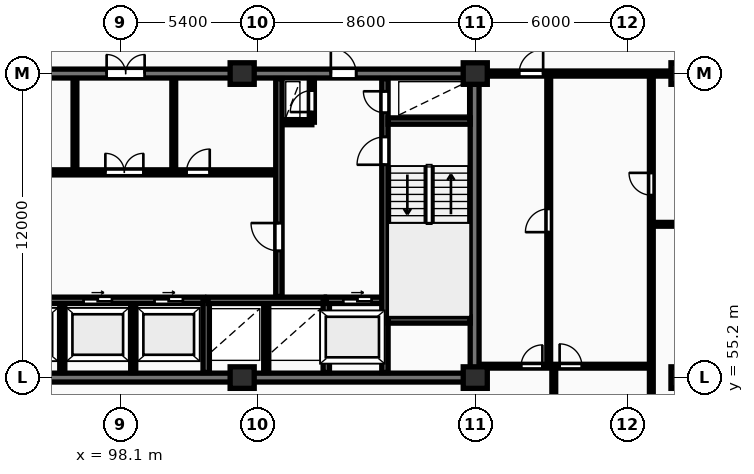
"""IFC4 building model, lengths in metres.
Left out: names, types, materials, properties, quantities, classifications, styles, units other than length and angle.
Written with IfcOpenShell. Run it as: python <this file> out.ifc"""

import sys

from ifc_helpers import new_model, si_unit, direction, frame, frame_2d, origin, origin_2d, place, context, subcontext, project, spatial, rectangle, extrude, element, fill, save


model = new_model("IFC4")
c1 = context("Model", 3, precision=1e-05, world=origin(), true_north=direction((0.0, 1.0)))
c2 = subcontext(c1, "Body", "Model", "MODEL_VIEW")
j1 = project(units=[si_unit("LENGTHUNIT", "METRE"), si_unit("PLANEANGLEUNIT", "RADIAN")], contexts=[c1])
p1 = place(None, origin())
s1 = spatial("IfcSite", under=j1, at=p1, CompositionType="ELEMENT")
p2 = place(p1, origin())
s2 = spatial("IfcBuilding", under=s1, at=p2, CompositionType="ELEMENT")
p3 = place(p2, frame((0.0, 0.0, 126.3)))
s3 = spatial("IfcBuildingStorey", under=s2, at=p3, CompositionType="ELEMENT", Elevation=126.3)
for number, where, z_axis, x_axis in (
    (1, (102.9, 55.2, 0.0), (0.0, 0.0, 1.0), (1.0, 0.0, 0.0)),
    (2, (102.9, 67.2, 0.0), (0.0, 0.0, 1.0), (1.0, 0.0, 0.0)),
    (3, (112.1, 55.2, 0.0), (0.0, 0.0, 1.0), (1.0, 0.0, 0.0)),
    (4, (112.1, 67.2, 0.0), (0.0, 0.0, 1.0), (1.0, 0.0, 0.0)),
    (5, (120.3, 55.2, 0.0), (0.0, 0.0, 1.0), (1.0, 0.0, 0.0)),
    (6, (120.3, 67.2, 0.0), (0.0, 0.0, 1.0), (1.0, 0.0, 0.0)),
):
    element("IfcColumn", number, at=place(p3, frame(where, z_axis=z_axis, x_axis=x_axis)), inside=s3, PredefinedType="COLUMN", context=c2, shape_type="SweptSolid", body=[
        extrude(rectangle(XDim=0.95, YDim=0.85, at=origin_2d()), origin(), (0.0, 0.0, 1.0), 3.25),
    ])
p4 = place(p3, frame((75.95, 55.2, 0.0), z_axis=(0.0, 0.0, 1.0), x_axis=(1.0, 0.0, 0.0)))
e7 = element("IfcWall", 7, at=p4, inside=s3, PredefinedType="SHEAR", context=c2, shape_type="SweptSolid", body=[
    extrude(rectangle(XDim=36.3, YDim=0.35, at=frame_2d((18.15, 0.0))), origin(), (0.0, 0.0, 1.0), 3.25),
])
p5 = place(p3, frame((112.075, 55.375, 0.0), z_axis=(0.0, 0.0, 1.0), x_axis=(0.0, 1.0, 0.0)))
e8 = element("IfcWall", 8, at=p5, inside=s3, PredefinedType="SHEAR", context=c2, shape_type="SweptSolid", body=[
    extrude(rectangle(XDim=11.65, YDim=0.35, at=frame_2d((5.825, 0.0))), origin(), (0.0, 0.0, 1.0), 3.25),
])
p6 = place(p3, frame((75.95, 67.2, 0.0), z_axis=(0.0, 0.0, 1.0), x_axis=(1.0, 0.0, 0.0)))
e9 = element("IfcWall", 9, at=p6, inside=s3, PredefinedType="SHEAR", context=c2, shape_type="SweptSolid", body=[
    extrude(rectangle(XDim=36.3, YDim=0.35, at=frame_2d((18.15, 0.0))), origin(), (0.0, 0.0, 1.0), 3.25),
])
p7 = place(p6, frame((5.25, 0.0, 0.0)))
e10 = element("IfcOpeningElement", 10, at=p7, cuts=e9, PredefinedType="OPENING", context=c2, shape_type="SweptSolid", body=[
    extrude(rectangle(XDim=1.0, YDim=2.15, at=frame_2d((0.5, 1.075))), frame((0.0, 0.185, 0.0), z_axis=(0.0, -1.0, 0.0), x_axis=(1.0, 0.0, 0.0)), (0.0, 0.0, 1.0), 0.37),
])
p8 = place(p6, frame((21.6, 0.0, 0.0)))
e11 = element("IfcOpeningElement", 11, at=p8, cuts=e9, PredefinedType="OPENING", context=c2, shape_type="SweptSolid", body=[
    extrude(rectangle(XDim=1.5, YDim=2.2, at=frame_2d((0.75, 1.1))), frame((0.0, 0.185, 0.0), z_axis=(0.0, -1.0, 0.0), x_axis=(1.0, 0.0, 0.0)), (0.0, 0.0, 1.0), 0.37),
])
p9 = place(p6, frame((30.45, 0.0, 0.0)))
e12 = element("IfcOpeningElement", 12, at=p9, cuts=e9, PredefinedType="OPENING", context=c2, shape_type="SweptSolid", body=[
    extrude(rectangle(XDim=1.0, YDim=2.15, at=frame_2d((0.5, 1.075))), frame((0.0, 0.185, 0.0), z_axis=(0.0, -1.0, 0.0), x_axis=(1.0, 0.0, 0.0)), (0.0, 0.0, 1.0), 0.37),
])
for number, where, z_axis, x_axis in (
    (13, (95.8, 55.4, 0.0), (0.0, 0.0, 1.0), (0.0, 1.0, 0.0)),
    (14, (98.6, 55.4, 0.0), (0.0, 0.0, 1.0), (0.0, 1.0, 0.0)),
):
    element("IfcWall", number, at=place(p3, frame(where, z_axis=z_axis, x_axis=x_axis)), inside=s3, PredefinedType="PARTITIONING", context=c2, shape_type="SweptSolid", body=[
        extrude(rectangle(XDim=2.72, YDim=0.2, at=frame_2d((1.36, 0.0))), origin(), (0.0, 0.0, 1.0), 2.97),
    ])
p10 = place(p3, frame((93.02, 58.25, 0.0), z_axis=(0.0, 0.0, 1.0), x_axis=(1.0, 0.0, 0.0)))
e15 = element("IfcWall", 15, at=p10, inside=s3, PredefinedType="SHEAR", context=c2, shape_type="SweptSolid", body=[
    extrude(rectangle(XDim=8.36, YDim=0.25, at=frame_2d((4.18, 0.0))), origin(), (0.0, 0.0, 1.0), 3.25),
])
p11 = place(p10, frame((0.82, 0.0, 0.0)))
e16 = element("IfcOpeningElement", 16, at=p11, cuts=e15, PredefinedType="OPENING", context=c2, shape_type="SweptSolid", body=[
    extrude(rectangle(XDim=1.12, YDim=2.12, at=frame_2d((0.56, 1.06))), frame((0.0, 0.135, 0.0), z_axis=(0.0, -1.0, 0.0), x_axis=(1.0, 0.0, 0.0)), (0.0, 0.0, 1.0), 0.27),
])
p12 = place(p10, frame((3.62, 0.0, 0.0)))
e17 = element("IfcOpeningElement", 17, at=p12, cuts=e15, PredefinedType="OPENING", context=c2, shape_type="SweptSolid", body=[
    extrude(rectangle(XDim=1.12, YDim=2.12, at=frame_2d((0.56, 1.06))), frame((0.0, 0.135, 0.0), z_axis=(0.0, -1.0, 0.0), x_axis=(1.0, 0.0, 0.0)), (0.0, 0.0, 1.0), 0.27),
])
p13 = place(p10, frame((6.42, 0.0, 0.0)))
e18 = element("IfcOpeningElement", 18, at=p13, cuts=e15, PredefinedType="OPENING", context=c2, shape_type="SweptSolid", body=[
    extrude(rectangle(XDim=1.12, YDim=2.12, at=frame_2d((0.56, 1.06))), frame((0.0, 0.135, 0.0), z_axis=(0.0, -1.0, 0.0), x_axis=(1.0, 0.0, 0.0)), (0.0, 0.0, 1.0), 0.27),
])
p14 = place(p3, frame((101.48, 55.4, 0.0), z_axis=(0.0, 0.0, 1.0), x_axis=(0.0, 1.0, 0.0)))
e19 = element("IfcWall", 19, at=p14, inside=s3, PredefinedType="SHEAR", context=c2, shape_type="SweptSolid", body=[
    extrude(rectangle(XDim=2.85, YDim=0.25, at=frame_2d((1.425, 0.0))), origin(), (0.0, 0.0, 1.0), 3.25),
])
p15 = place(p3, frame((103.85, 55.4, 0.0), z_axis=(0.0, 0.0, 1.0), x_axis=(0.0, 1.0, 0.0)))
e20 = element("IfcWall", 20, at=p15, inside=s3, PredefinedType="PARTITIONING", context=c2, shape_type="SweptSolid", body=[
    extrude(rectangle(XDim=2.72, YDim=0.2, at=frame_2d((1.36, 0.0))), origin(), (0.0, 0.0, 1.0), 2.97),
])
p16 = place(p3, frame((101.55, 58.25, 0.0), z_axis=(0.0, 0.0, 1.0), x_axis=(1.0, 0.0, 0.0)))
e21 = element("IfcWall", 21, at=p16, inside=s3, PredefinedType="SHEAR", context=c2, shape_type="SweptSolid", body=[
    extrude(rectangle(XDim=4.6, YDim=0.25, at=frame_2d((2.3, 0.0))), origin(), (0.0, 0.0, 1.0), 3.25),
])
p17 = place(p3, frame((106.22, 55.4, 0.0), z_axis=(0.0, 0.0, 1.0), x_axis=(0.0, 1.0, 0.0)))
e22 = element("IfcWall", 22, at=p17, inside=s3, PredefinedType="SHEAR", context=c2, shape_type="SweptSolid", body=[
    extrude(rectangle(XDim=2.85, YDim=0.25, at=frame_2d((1.425, 0.0))), origin(), (0.0, 0.0, 1.0), 3.25),
])
p18 = place(p3, frame((106.22, 58.25, 0.0), z_axis=(0.0, 0.0, 1.0), x_axis=(1.0, 0.0, 0.0)))
e23 = element("IfcWall", 23, at=p18, inside=s3, PredefinedType="SHEAR", context=c2, shape_type="SweptSolid", body=[
    extrude(rectangle(XDim=2.46, YDim=0.25, at=frame_2d((1.23, 0.0))), origin(), (0.0, 0.0, 1.0), 3.25),
])
p19 = place(p18, frame((0.67, 0.0, 0.0)))
e24 = element("IfcOpeningElement", 24, at=p19, cuts=e23, PredefinedType="OPENING", context=c2, shape_type="SweptSolid", body=[
    extrude(rectangle(XDim=1.12, YDim=2.12, at=frame_2d((0.56, 1.06))), frame((0.0, 0.135, 0.0), z_axis=(0.0, -1.0, 0.0), x_axis=(1.0, 0.0, 0.0)), (0.0, 0.0, 1.0), 0.27),
])
for number, where, z_axis, x_axis in (
    (25, (96.3, 63.4, 0.0), (0.0, 0.0, 1.0), (0.0, 1.0, 0.0)),
    (26, (100.2, 63.4, 0.0), (0.0, 0.0, 1.0), (0.0, 1.0, 0.0)),
):
    element("IfcWall", number, at=place(p3, frame(where, z_axis=z_axis, x_axis=x_axis)), inside=s3, PredefinedType="PARTITIONING", context=c2, shape_type="SweptSolid", body=[
        extrude(rectangle(XDim=3.6, YDim=0.15, at=frame_2d((1.8, 0.0))), origin(), (0.0, 0.0, 1.0), 2.97),
    ])
p20 = place(p3, frame((84.42, 63.3, 0.0), z_axis=(0.0, 0.0, 1.0), x_axis=(1.0, 0.0, 0.0)))
e27 = element("IfcWall", 27, at=p20, inside=s3, PredefinedType="PARTITIONING", context=c2, shape_type="SweptSolid", body=[
    extrude(rectangle(XDim=19.83, YDim=0.2, at=frame_2d((9.915, 0.0))), origin(), (0.0, 0.0, 1.0), 2.97),
])
p21 = place(p20, frame((1.15, 0.0, 0.0)))
e28 = element("IfcOpeningElement", 28, at=p21, cuts=e27, PredefinedType="OPENING", context=c2, shape_type="SweptSolid", body=[
    extrude(rectangle(XDim=0.85, YDim=2.05, at=frame_2d((0.425, 1.025))), frame((0.0, 0.11, 0.0), z_axis=(0.0, -1.0, 0.0), x_axis=(1.0, 0.0, 0.0)), (0.0, 0.0, 1.0), 0.22),
])
p22 = place(p20, frame((3.25, 0.0, 0.0)))
e29 = element("IfcOpeningElement", 29, at=p22, cuts=e27, PredefinedType="OPENING", context=c2, shape_type="SweptSolid", body=[
    extrude(rectangle(XDim=0.85, YDim=2.05, at=frame_2d((0.425, 1.025))), frame((0.0, 0.11, 0.0), z_axis=(0.0, -1.0, 0.0), x_axis=(1.0, 0.0, 0.0)), (0.0, 0.0, 1.0), 0.22),
])
p23 = place(p20, frame((13.08, 0.0, 0.0)))
e30 = element("IfcOpeningElement", 30, at=p23, cuts=e27, PredefinedType="OPENING", context=c2, shape_type="SweptSolid", body=[
    extrude(rectangle(XDim=1.5, YDim=2.2, at=frame_2d((0.75, 1.1))), frame((0.0, 0.11, 0.0), z_axis=(0.0, -1.0, 0.0), x_axis=(1.0, 0.0, 0.0)), (0.0, 0.0, 1.0), 0.22),
])
p24 = place(p20, frame((6.78, 0.0, 0.0)))
e31 = element("IfcOpeningElement", 31, at=p24, cuts=e27, PredefinedType="OPENING", context=c2, shape_type="SweptSolid", body=[
    extrude(rectangle(XDim=0.92, YDim=2.08, at=frame_2d((0.46, 1.04))), frame((0.0, 0.11, 0.0), z_axis=(0.0, -1.0, 0.0), x_axis=(1.0, 0.0, 0.0)), (0.0, 0.0, 1.0), 0.22),
])
p25 = place(p20, frame((16.28, 0.0, 0.0)))
e32 = element("IfcOpeningElement", 32, at=p25, cuts=e27, PredefinedType="OPENING", context=c2, shape_type="SweptSolid", body=[
    extrude(rectangle(XDim=0.92, YDim=2.08, at=frame_2d((0.46, 1.04))), frame((0.0, 0.11, 0.0), z_axis=(0.0, -1.0, 0.0), x_axis=(1.0, 0.0, 0.0)), (0.0, 0.0, 1.0), 0.22),
])
p26 = place(p3, frame((104.45, 65.28, 0.0), z_axis=(0.0, 0.0, 1.0), x_axis=(1.0, 0.0, 0.0)))
e33 = element("IfcWall", 33, at=p26, inside=s3, PredefinedType="PARTITIONING", context=c2, shape_type="SweptSolid", body=[
    extrude(rectangle(XDim=1.2, YDim=0.2, at=frame_2d((0.6, 0.0))), origin(), (0.0, 0.0, 1.0), 2.97),
])
p27 = place(p3, frame((105.65, 65.28, 0.0), z_axis=(0.0, 0.0, 1.0), x_axis=(0.0, 1.0, 0.0)))
e34 = element("IfcWall", 34, at=p27, inside=s3, PredefinedType="PARTITIONING", context=c2, shape_type="SweptSolid", body=[
    extrude(rectangle(XDim=1.72, YDim=0.2, at=frame_2d((0.86, 0.0))), origin(), (0.0, 0.0, 1.0), 2.97),
])
p28 = place(p27, frame((0.4, 0.0, 0.0)))
e35 = element("IfcOpeningElement", 35, at=p28, cuts=e34, PredefinedType="OPENING", context=c2, shape_type="SweptSolid", body=[
    extrude(rectangle(XDim=0.85, YDim=2.05, at=frame_2d((0.425, 1.025))), frame((0.0, 0.11, 0.0), z_axis=(0.0, -1.0, 0.0), x_axis=(1.0, 0.0, 0.0)), (0.0, 0.0, 1.0), 0.22),
])
p29 = place(p3, frame((104.35, 58.4, 0.0), z_axis=(0.0, 0.0, 1.0), x_axis=(0.0, 1.0, 0.0)))
e36 = element("IfcWall", 36, at=p29, inside=s3, PredefinedType="SHEAR", context=c2, shape_type="SweptSolid", body=[
    extrude(rectangle(XDim=8.6, YDim=0.25, at=frame_2d((4.3, 0.0))), origin(), (0.0, 0.0, 1.0), 3.25),
])
p30 = place(p29, frame((1.8, 0.0, 0.0)))
e37 = element("IfcOpeningElement", 37, at=p30, cuts=e36, PredefinedType="OPENING", context=c2, shape_type="SweptSolid", body=[
    extrude(rectangle(XDim=1.1, YDim=2.1, at=frame_2d((0.55, 1.05))), frame((0.0, 0.135, 0.0), z_axis=(0.0, -1.0, 0.0), x_axis=(1.0, 0.0, 0.0)), (0.0, 0.0, 1.0), 0.27),
])
p31 = place(p3, frame((108.535, 55.4, 0.0), z_axis=(0.0, 0.0, 1.0), x_axis=(0.0, 1.0, 0.0)))
e38 = element("IfcWall", 38, at=p31, inside=s3, PredefinedType="SHEAR", context=c2, shape_type="SweptSolid", body=[
    extrude(rectangle(XDim=11.6, YDim=0.25, at=frame_2d((5.8, 0.0))), origin(), (0.0, 0.0, 1.0), 3.25),
])
p32 = place(p31, frame((8.2, 0.0, 0.0)))
e39 = element("IfcOpeningElement", 39, at=p32, cuts=e38, PredefinedType="OPENING", context=c2, shape_type="SweptSolid", body=[
    extrude(rectangle(XDim=1.1, YDim=2.1, at=frame_2d((0.55, 1.05))), frame((0.0, 0.135, 0.0), z_axis=(0.0, -1.0, 0.0), x_axis=(1.0, 0.0, 0.0)), (0.0, 0.0, 1.0), 0.27),
])
p33 = place(p31, frame((10.25, 0.0, 0.0)))
e40 = element("IfcOpeningElement", 40, at=p33, cuts=e38, PredefinedType="OPENING", context=c2, shape_type="SweptSolid", body=[
    extrude(rectangle(XDim=0.85, YDim=2.05, at=frame_2d((0.425, 1.025))), frame((0.0, 0.135, 0.0), z_axis=(0.0, -1.0, 0.0), x_axis=(1.0, 0.0, 0.0)), (0.0, 0.0, 1.0), 0.27),
])
for number, where, z_axis, x_axis in (
    (41, (108.66, 57.475, 0.0), (0.0, 0.0, 1.0), (1.0, 0.0, 0.0)),
    (42, (108.66, 65.325, 0.0), (0.0, 0.0, 1.0), (1.0, 0.0, 0.0)),
):
    element("IfcWall", number, at=place(p3, frame(where, z_axis=z_axis, x_axis=x_axis)), inside=s3, PredefinedType="SHEAR", context=c2, shape_type="SweptSolid", body=[
        extrude(rectangle(XDim=3.24, YDim=0.25, at=frame_2d((1.62, 0.0))), origin(), (0.0, 0.0, 1.0), 3.25),
    ])
p34 = place(p3, frame((119.05, 61.25, 0.0), z_axis=(0.0, 0.0, 1.0), x_axis=(1.0, 0.0, 0.0)))
e43 = element("IfcWall", 43, at=p34, inside=s3, PredefinedType="PARTITIONING", context=c2, shape_type="SweptSolid", body=[
    extrude(rectangle(XDim=11.55, YDim=0.15, at=frame_2d((5.775, 0.0))), origin(), (0.0, 0.0, 1.0), 2.97),
])
p35 = place(p34, frame((5.355, 0.0, 0.0)))
e44 = element("IfcOpeningElement", 44, at=p35, cuts=e43, PredefinedType="OPENING", context=c2, shape_type="SweptSolid", body=[
    extrude(rectangle(XDim=0.84, YDim=2.04, at=frame_2d((0.42, 1.02))), frame((0.0, 0.085, 0.0), z_axis=(0.0, -1.0, 0.0), x_axis=(1.0, 0.0, 0.0)), (0.0, 0.0, 1.0), 0.17),
])
p36 = place(p3, frame((119.05, 51.1, 0.0), z_axis=(0.0, 0.0, 1.0), x_axis=(0.0, 1.0, 0.0)))
e45 = element("IfcWall", 45, at=p36, inside=s3, PredefinedType="PARTITIONING", context=c2, shape_type="SweptSolid", body=[
    extrude(rectangle(XDim=16.05, YDim=0.15, at=frame_2d((8.025, 0.0))), origin(), (0.0, 0.0, 1.0), 2.97),
])
p37 = place(p36, frame((11.3, 0.0, 0.0)))
e46 = element("IfcOpeningElement", 46, at=p37, cuts=e45, PredefinedType="OPENING", context=c2, shape_type="SweptSolid", body=[
    extrude(rectangle(XDim=0.88, YDim=2.06, at=frame_2d((0.44, 1.03))), frame((0.0, 0.085, 0.0), z_axis=(0.0, -1.0, 0.0), x_axis=(1.0, 0.0, 0.0)), (0.0, 0.0, 1.0), 0.17),
])
p38 = place(p3, frame((115.0, 55.65, 0.0), z_axis=(0.0, 0.0, 1.0), x_axis=(0.0, 1.0, 0.0)))
e47 = element("IfcWall", 47, at=p38, inside=s3, PredefinedType="PARTITIONING", context=c2, shape_type="SweptSolid", body=[
    extrude(rectangle(XDim=11.5, YDim=0.15, at=frame_2d((5.75, 0.0))), origin(), (0.0, 0.0, 1.0), 2.97),
])
p39 = place(p38, frame((5.29, 0.0, 0.0)))
e48 = element("IfcOpeningElement", 48, at=p39, cuts=e47, PredefinedType="OPENING", context=c2, shape_type="SweptSolid", body=[
    extrude(rectangle(XDim=0.92, YDim=2.08, at=frame_2d((0.46, 1.04))), frame((0.0, 0.085, 0.0), z_axis=(0.0, -1.0, 0.0), x_axis=(1.0, 0.0, 0.0)), (0.0, 0.0, 1.0), 0.17),
])
p40 = place(p3, frame((115.2, 51.1, 0.0), z_axis=(0.0, 0.0, 1.0), x_axis=(0.0, 1.0, 0.0)))
e49 = element("IfcWall", 49, at=p40, inside=s3, PredefinedType="PARTITIONING", context=c2, shape_type="SweptSolid", body=[
    extrude(rectangle(XDim=4.55, YDim=0.15, at=frame_2d((2.275, 0.0))), origin(), (0.0, 0.0, 1.0), 2.97),
])
p41 = place(p3, frame((112.27, 55.65, 0.0), z_axis=(0.0, 0.0, 1.0), x_axis=(1.0, 0.0, 0.0)))
e50 = element("IfcWall", 50, at=p41, inside=s3, PredefinedType="PARTITIONING", context=c2, shape_type="SweptSolid", body=[
    extrude(rectangle(XDim=6.76, YDim=0.15, at=frame_2d((3.38, 0.0))), origin(), (0.0, 0.0, 1.0), 2.97),
])
p42 = place(p41, frame((1.64, 0.0, 0.0)))
e51 = element("IfcOpeningElement", 51, at=p42, cuts=e50, PredefinedType="OPENING", context=c2, shape_type="SweptSolid", body=[
    extrude(rectangle(XDim=0.84, YDim=2.04, at=frame_2d((0.42, 1.02))), frame((0.0, 0.085, 0.0), z_axis=(0.0, -1.0, 0.0), x_axis=(1.0, 0.0, 0.0)), (0.0, 0.0, 1.0), 0.17),
])
p43 = place(p41, frame((3.16, 0.0, 0.0)))
e52 = element("IfcOpeningElement", 52, at=p43, cuts=e50, PredefinedType="OPENING", context=c2, shape_type="SweptSolid", body=[
    extrude(rectangle(XDim=0.88, YDim=2.06, at=frame_2d((0.44, 1.03))), frame((0.0, 0.085, 0.0), z_axis=(0.0, -1.0, 0.0), x_axis=(1.0, 0.0, 0.0)), (0.0, 0.0, 1.0), 0.17),
])
p44 = place(p3, frame((112.25, 67.2, 0.0), z_axis=(0.0, 0.0, 1.0), x_axis=(1.0, 0.0, 0.0)))
e53 = element("IfcWall", 53, at=p44, inside=s3, PredefinedType="PARTITIONING", context=c2, shape_type="SweptSolid", body=[
    extrude(rectangle(XDim=18.35, YDim=0.2, at=frame_2d((9.175, 0.0))), origin(), (0.0, 0.0, 1.0), 2.433),
])
p45 = place(p44, frame((1.58, 0.0, 0.0)))
e54 = element("IfcOpeningElement", 54, at=p45, cuts=e53, PredefinedType="OPENING", context=c2, shape_type="SweptSolid", body=[
    extrude(rectangle(XDim=0.95, YDim=2.15, at=frame_2d((0.475, 1.075))), frame((0.0, 0.11, 0.0), z_axis=(0.0, -1.0, 0.0), x_axis=(1.0, 0.0, 0.0)), (0.0, 0.0, 1.0), 0.22),
])
p46 = place(p8, origin())
e55 = element("IfcDoor", 55, at=p46, inside=s3, OperationType="DOUBLE_DOOR_SINGLE_SWING", PredefinedType="DOOR", context=c2, shape_type="SweptSolid", body=[
    extrude(rectangle(XDim=1.5, YDim=2.2, at=frame_2d((0.75, 1.1))), frame((0.0, 0.025, 0.0), z_axis=(0.0, -1.0, 0.0), x_axis=(1.0, 0.0, 0.0)), (0.0, 0.0, 1.0), 0.05),
])
fill(e11, e55)
p47 = place(p9, origin())
e56 = element("IfcDoor", 56, at=p47, inside=s3, OperationType="SINGLE_SWING_LEFT", PredefinedType="DOOR", context=c2, shape_type="SweptSolid", body=[
    extrude(rectangle(XDim=1.0, YDim=2.15, at=frame_2d((0.5, 1.075))), frame((0.0, 0.025, 0.0), z_axis=(0.0, -1.0, 0.0), x_axis=(1.0, 0.0, 0.0)), (0.0, 0.0, 1.0), 0.05),
])
fill(e12, e56)
p48 = place(p12, origin())
e57 = element("IfcDoor", 57, at=p48, inside=s3, OperationType="SLIDING_TO_RIGHT", PredefinedType="DOOR", context=c2, shape_type="SweptSolid", body=[
    extrude(rectangle(XDim=1.12, YDim=2.12, at=frame_2d((0.56, 1.06))), frame((0.0, 0.025, 0.0), z_axis=(0.0, -1.0, 0.0), x_axis=(1.0, 0.0, 0.0)), (0.0, 0.0, 1.0), 0.05),
])
fill(e17, e57)
p49 = place(p13, origin())
e58 = element("IfcDoor", 58, at=p49, inside=s3, OperationType="SLIDING_TO_RIGHT", PredefinedType="DOOR", context=c2, shape_type="SweptSolid", body=[
    extrude(rectangle(XDim=1.12, YDim=2.12, at=frame_2d((0.56, 1.06))), frame((0.0, 0.025, 0.0), z_axis=(0.0, -1.0, 0.0), x_axis=(1.0, 0.0, 0.0)), (0.0, 0.0, 1.0), 0.05),
])
fill(e18, e58)
p50 = place(p19, origin())
e59 = element("IfcDoor", 59, at=p50, inside=s3, OperationType="SLIDING_TO_RIGHT", PredefinedType="DOOR", context=c2, shape_type="SweptSolid", body=[
    extrude(rectangle(XDim=1.12, YDim=2.12, at=frame_2d((0.56, 1.06))), frame((0.0, 0.025, 0.0), z_axis=(0.0, -1.0, 0.0), x_axis=(1.0, 0.0, 0.0)), (0.0, 0.0, 1.0), 0.05),
])
fill(e24, e59)
p51 = place(p23, origin())
e60 = element("IfcDoor", 60, at=p51, inside=s3, OperationType="DOUBLE_DOOR_SINGLE_SWING", PredefinedType="DOOR", context=c2, shape_type="SweptSolid", body=[
    extrude(rectangle(XDim=1.5, YDim=2.2, at=frame_2d((0.75, 1.1))), frame((0.0, 0.025, 0.0), z_axis=(0.0, -1.0, 0.0), x_axis=(1.0, 0.0, 0.0)), (0.0, 0.0, 1.0), 0.05),
])
fill(e30, e60)
p52 = place(p25, origin())
e61 = element("IfcDoor", 61, at=p52, inside=s3, OperationType="SINGLE_SWING_RIGHT", PredefinedType="DOOR", context=c2, shape_type="SweptSolid", body=[
    extrude(rectangle(XDim=0.92, YDim=2.08, at=frame_2d((0.46, 1.04))), frame((0.0, 0.025, 0.0), z_axis=(0.0, -1.0, 0.0), x_axis=(1.0, 0.0, 0.0)), (0.0, 0.0, 1.0), 0.05),
])
fill(e32, e61)
p53 = place(p28, origin())
e62 = element("IfcDoor", 62, at=p53, inside=s3, OperationType="SINGLE_SWING_LEFT", PredefinedType="DOOR", context=c2, shape_type="SweptSolid", body=[
    extrude(rectangle(XDim=0.85, YDim=2.05, at=frame_2d((0.425, 1.025))), frame((0.0, 0.025, 0.0), z_axis=(0.0, -1.0, 0.0), x_axis=(1.0, 0.0, 0.0)), (0.0, 0.0, 1.0), 0.05),
])
fill(e35, e62)
p54 = place(p30, origin())
e63 = element("IfcDoor", 63, at=p54, inside=s3, OperationType="SINGLE_SWING_RIGHT", PredefinedType="DOOR", context=c2, shape_type="SweptSolid", body=[
    extrude(rectangle(XDim=1.1, YDim=2.1, at=frame_2d((0.55, 1.05))), frame((0.0, 0.025, 0.0), z_axis=(0.0, -1.0, 0.0), x_axis=(1.0, 0.0, 0.0)), (0.0, 0.0, 1.0), 0.05),
])
fill(e37, e63)
p55 = place(p32, origin())
e64 = element("IfcDoor", 64, at=p55, inside=s3, OperationType="SINGLE_SWING_LEFT", PredefinedType="DOOR", context=c2, shape_type="SweptSolid", body=[
    extrude(rectangle(XDim=1.1, YDim=2.1, at=frame_2d((0.55, 1.05))), frame((0.0, 0.025, 0.0), z_axis=(0.0, -1.0, 0.0), x_axis=(1.0, 0.0, 0.0)), (0.0, 0.0, 1.0), 0.05),
])
fill(e39, e64)
p56 = place(p33, origin())
e65 = element("IfcDoor", 65, at=p56, inside=s3, OperationType="SINGLE_SWING_RIGHT", PredefinedType="DOOR", context=c2, shape_type="SweptSolid", body=[
    extrude(rectangle(XDim=0.85, YDim=2.05, at=frame_2d((0.425, 1.025))), frame((0.0, 0.025, 0.0), z_axis=(0.0, -1.0, 0.0), x_axis=(1.0, 0.0, 0.0)), (0.0, 0.0, 1.0), 0.05),
])
fill(e40, e65)
p57 = place(p37, origin())
e66 = element("IfcDoor", 66, at=p57, inside=s3, OperationType="SINGLE_SWING_RIGHT", PredefinedType="DOOR", context=c2, shape_type="SweptSolid", body=[
    extrude(rectangle(XDim=0.88, YDim=2.06, at=frame_2d((0.44, 1.03))), frame((0.0, 0.025, 0.0), z_axis=(0.0, -1.0, 0.0), x_axis=(1.0, 0.0, 0.0)), (0.0, 0.0, 1.0), 0.05),
])
fill(e46, e66)
p58 = place(p39, origin())
e67 = element("IfcDoor", 67, at=p58, inside=s3, OperationType="SINGLE_SWING_LEFT", PredefinedType="DOOR", context=c2, shape_type="SweptSolid", body=[
    extrude(rectangle(XDim=0.92, YDim=2.08, at=frame_2d((0.46, 1.04))), frame((0.0, 0.025, 0.0), z_axis=(0.0, -1.0, 0.0), x_axis=(1.0, 0.0, 0.0)), (0.0, 0.0, 1.0), 0.05),
])
fill(e48, e67)
p59 = place(p42, origin())
e68 = element("IfcDoor", 68, at=p59, inside=s3, OperationType="SINGLE_SWING_RIGHT", PredefinedType="DOOR", context=c2, shape_type="SweptSolid", body=[
    extrude(rectangle(XDim=0.84, YDim=2.04, at=frame_2d((0.42, 1.02))), frame((0.0, 0.025, 0.0), z_axis=(0.0, -1.0, 0.0), x_axis=(1.0, 0.0, 0.0)), (0.0, 0.0, 1.0), 0.05),
])
fill(e51, e68)
p60 = place(p43, origin())
e69 = element("IfcDoor", 69, at=p60, inside=s3, OperationType="SINGLE_SWING_LEFT", PredefinedType="DOOR", context=c2, shape_type="SweptSolid", body=[
    extrude(rectangle(XDim=0.88, YDim=2.06, at=frame_2d((0.44, 1.03))), frame((0.0, 0.025, 0.0), z_axis=(0.0, -1.0, 0.0), x_axis=(1.0, 0.0, 0.0)), (0.0, 0.0, 1.0), 0.05),
])
fill(e52, e69)
p61 = place(p45, origin())
e70 = element("IfcDoor", 70, at=p61, inside=s3, OperationType="SINGLE_SWING_RIGHT", PredefinedType="DOOR", context=c2, shape_type="SweptSolid", body=[
    extrude(rectangle(XDim=0.95, YDim=2.15, at=frame_2d((0.475, 1.075))), frame((0.0, 0.025, 0.0), z_axis=(0.0, -1.0, 0.0), x_axis=(1.0, 0.0, 0.0)), (0.0, 0.0, 1.0), 0.05),
])
fill(e54, e70)
save(model, sys.argv[1])
